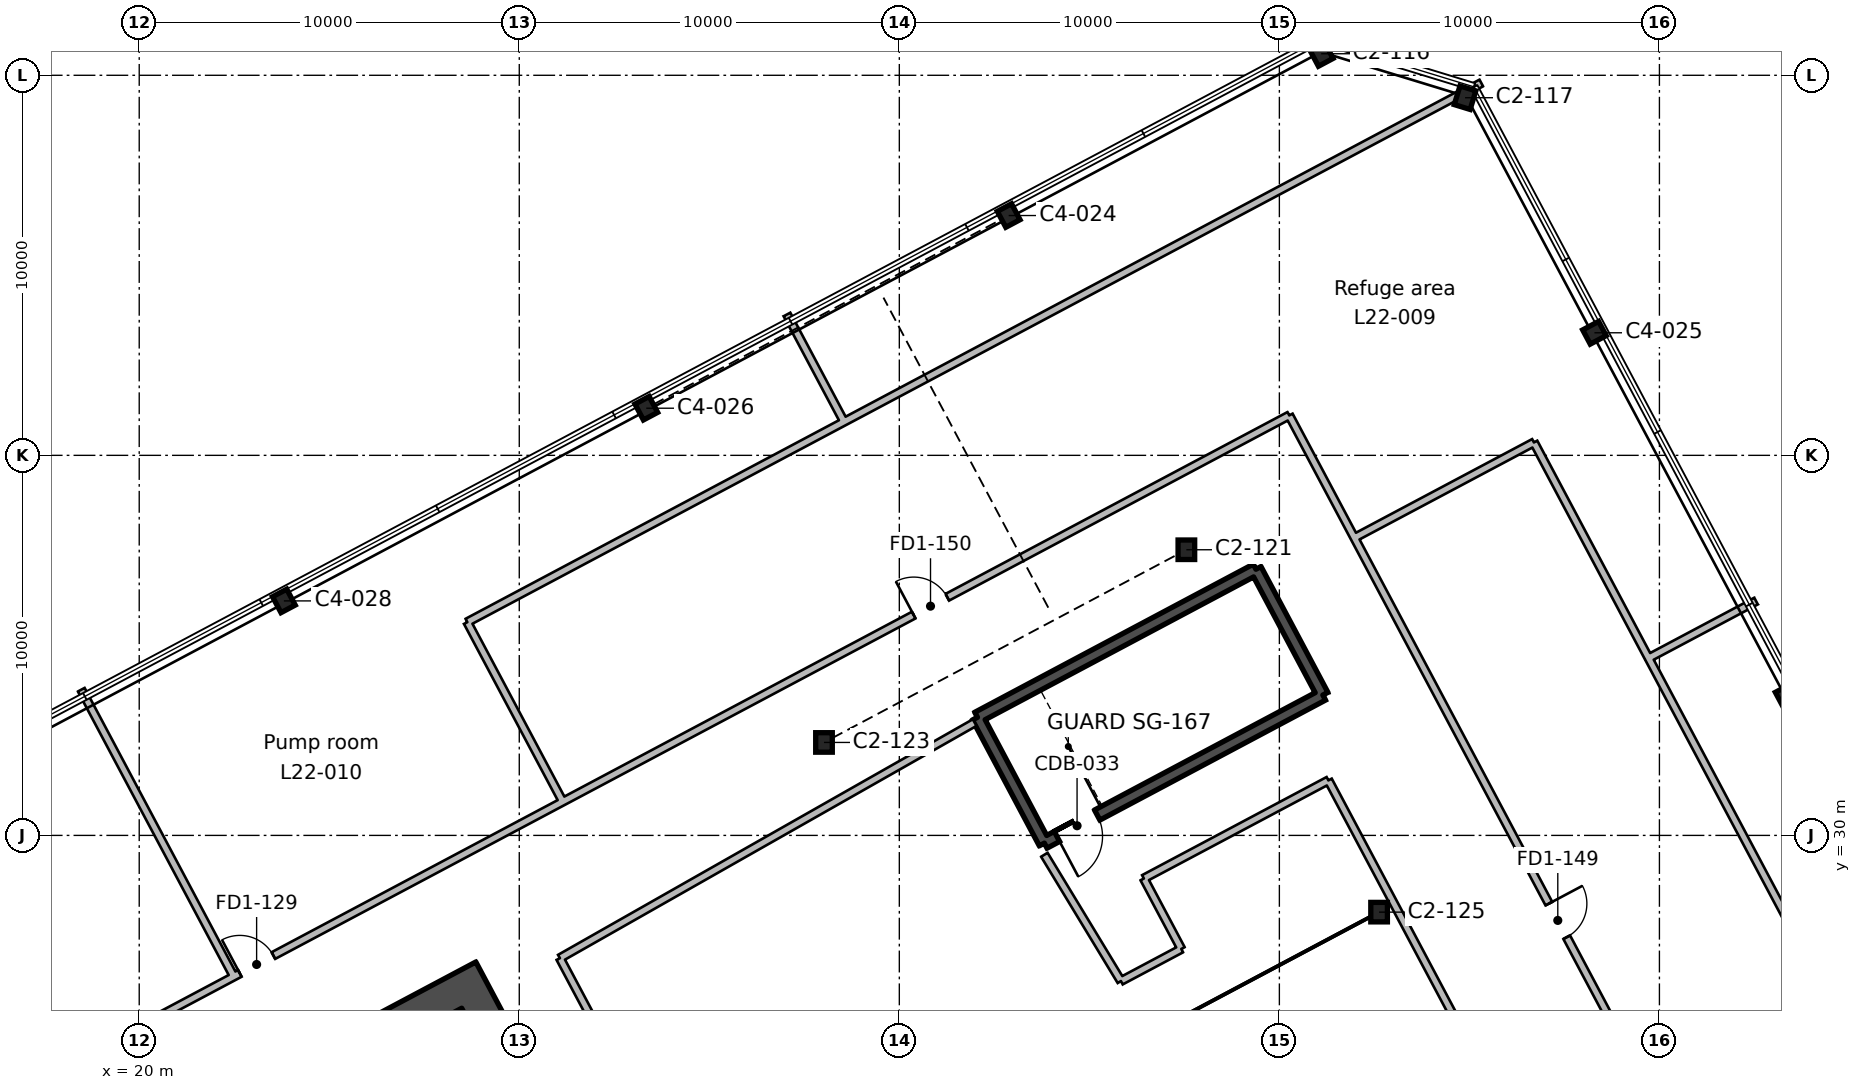
"""IFC4 building model, lengths in metres.
Left out: names, types, materials, properties, quantities, classifications, styles, units other than length and angle.
Written with IfcOpenShell. Run it as: python <this file> out.ifc"""

import sys

from ifc_helpers import new_model, si_unit, direction, frame, frame_2d, origin, origin_2d, place, context, subcontext, project, spatial, rectangle, i_section, extrude, element, fill, save


model = new_model("IFC4")
c1 = context("Model", 3, precision=1e-05, world=origin(), true_north=direction((0.0, 1.0)))
c2 = subcontext(c1, "Body", "Model", "MODEL_VIEW")
j1 = project(units=[si_unit("LENGTHUNIT", "METRE"), si_unit("PLANEANGLEUNIT", "RADIAN")], contexts=[c1])
p1 = place(None, origin())
s1 = spatial("IfcSite", under=j1, at=p1, CompositionType="ELEMENT")
p2 = place(p1, origin())
s2 = spatial("IfcBuilding", under=s1, at=p2, CompositionType="ELEMENT")
p3 = place(p2, frame((0.0, 0.0, 112.2)))
s3 = spatial("IfcBuildingStorey", under=s2, at=p3, CompositionType="ELEMENT", Elevation=112.2)
for number, where, z_axis, x_axis in (
    (1, (52.624, 27.981, 0.0), (0.0, 0.0, 1.0), (1.0, 0.0, 0.0)),
    (2, (38.018, 32.446, 0.0), (0.0, 0.0, 1.0), (1.0, 0.0, 0.0)),
):
    element("IfcColumn", number, at=place(p3, frame(where, z_axis=z_axis, x_axis=x_axis)), inside=s3, PredefinedType="COLUMN", context=c2, shape_type="SweptSolid", body=[
        extrude(i_section(OverallWidth=0.437, OverallDepth=0.513, WebThickness=0.061, FlangeThickness=0.097, FilletRadius=0.015, at=origin_2d()), origin(), (0.0, 0.0, 1.0), 6.0),
    ])
for number, where, z_axis, x_axis in (
    (3, (63.36, 33.689, 0.0), (0.0, 0.0, 1.0), (-0.469, 0.883, 0.0)),
    (4, (23.806, 36.17, 0.0), (0.0, 0.0, 1.0), (-0.883, -0.469, 0.0)),
):
    element("IfcColumn", number, at=place(p3, frame(where, z_axis=z_axis, x_axis=x_axis)), inside=s3, PredefinedType="COLUMN", context=c2, shape_type="SweptSolid", body=[
        extrude(i_section(OverallWidth=0.424, OverallDepth=0.475, WebThickness=0.048, FlangeThickness=0.077, FilletRadius=0.015, at=origin_2d()), origin(), (0.0, 0.0, 1.0), 6.0),
    ])
p4 = place(p3, frame((47.553, 37.516, 0.0), z_axis=(0.0, 0.0, 1.0), x_axis=(1.0, 0.0, 0.0)))
e5 = element("IfcColumn", 5, at=p4, inside=s3, PredefinedType="COLUMN", context=c2, shape_type="SweptSolid", body=[
    extrude(i_section(OverallWidth=0.437, OverallDepth=0.513, WebThickness=0.061, FlangeThickness=0.097, FilletRadius=0.015, at=origin_2d()), origin(), (0.0, 0.0, 1.0), 6.0),
])
for number, where, z_axis, x_axis in (
    (6, (33.342, 41.24, 0.0), (0.0, 0.0, 1.0), (-0.883, -0.469, 0.0)),
    (7, (58.29, 43.225, 0.0), (0.0, 0.0, 1.0), (-0.469, 0.883, 0.0)),
    (8, (42.877, 46.31, 0.0), (0.0, 0.0, 1.0), (-0.883, -0.469, 0.0)),
):
    element("IfcColumn", number, at=place(p3, frame(where, z_axis=z_axis, x_axis=x_axis)), inside=s3, PredefinedType="COLUMN", context=c2, shape_type="SweptSolid", body=[
        extrude(i_section(OverallWidth=0.424, OverallDepth=0.475, WebThickness=0.048, FlangeThickness=0.077, FilletRadius=0.015, at=origin_2d()), origin(), (0.0, 0.0, 1.0), 6.0),
    ])
for number, where, z_axis, x_axis in (
    (9, (54.886, 49.41, 0.0), (0.0, 0.0, 1.0), (-0.956, 0.292, 0.0)),
    (10, (51.1, 50.567, 0.0), (0.0, 0.0, 1.0), (-0.883, -0.469, 0.0)),
):
    element("IfcColumn", number, at=place(p3, frame(where, z_axis=z_axis, x_axis=x_axis)), inside=s3, PredefinedType="COLUMN", context=c2, shape_type="SweptSolid", body=[
        extrude(i_section(OverallWidth=0.437, OverallDepth=0.513, WebThickness=0.061, FlangeThickness=0.097, FilletRadius=0.015, at=origin_2d()), origin(), (0.0, 0.0, 1.0), 6.0),
    ])
p5 = place(p3, frame((37.849, 8.799, 0.0), z_axis=(0.0, 0.0, 1.0), x_axis=(-0.469465789982, 0.882950662289, 0.0)))
e11 = element("IfcWall", 11, at=p5, inside=s3, PredefinedType="SHEAR", context=c2, shape_type="SweptSolid", body=[
    extrude(rectangle(XDim=20.0, YDim=0.9, at=frame_2d((10.0, 0.0))), origin(), (0.0, 0.0, 1.0), 6.0),
])
p6 = place(p5, frame((10.6, 0.0, 0.0)))
e12 = element("IfcOpeningElement", 12, at=p6, cuts=e11, PredefinedType="OPENING", context=c2, shape_type="SweptSolid", body=[
    extrude(rectangle(XDim=2.4, YDim=2.4, at=frame_2d((1.2, 1.2))), frame((0.0, 0.46, 0.0), z_axis=(0.0, -1.0, 0.0), x_axis=(1.0, 0.0, 0.0)), (0.0, 0.0, 1.0), 0.92),
])
p7 = place(p3, frame((10.438, 16.366, 0.0), z_axis=(0.0, 0.0, 1.0), x_axis=(0.88294509198, 0.469476266226, 0.0)))
e13 = element("IfcWall", 13, at=p7, inside=s3, PredefinedType="SHEAR", context=c2, shape_type="SweptSolid", body=[
    extrude(rectangle(XDim=20.2, YDim=0.9, at=frame_2d((10.1, 0.0))), origin(), (0.0, 0.0, 1.0), 6.0),
])
p8 = place(p3, frame((49.384, 37.004, 0.0), z_axis=(0.0, 0.0, 1.0), x_axis=(0.46946936446, -0.882948761726, 0.0)))
e14 = element("IfcWall", 14, at=p8, inside=s3, PredefinedType="SHEAR", context=c2, shape_type="SweptSolid", body=[
    extrude(rectangle(XDim=3.75, YDim=0.3, at=frame_2d((1.875, 0.0))), origin(), (0.0, 0.0, 1.0), 6.0),
])
p9 = place(p3, frame((51.145, 33.693, 0.0), z_axis=(0.0, 0.0, 1.0), x_axis=(-0.882945809314, -0.469474917132, 0.0)))
e15 = element("IfcWall", 15, at=p9, inside=s3, PredefinedType="SHEAR", context=c2, shape_type="SweptSolid", body=[
    extrude(rectangle(XDim=8.3, YDim=0.3, at=frame_2d((4.15, 0.0))), origin(), (0.0, 0.0, 1.0), 6.0),
])
p10 = place(p9, frame((6.725, 0.0, 0.0)))
e16 = element("IfcOpeningElement", 16, at=p10, cuts=e15, PredefinedType="OPENING", context=c2, shape_type="SweptSolid", body=[
    extrude(rectangle(XDim=1.2, YDim=2.1, at=frame_2d((0.6, 1.05))), frame((0.0, 0.16, 0.0), z_axis=(0.0, -1.0, 0.0), x_axis=(1.0, 0.0, 0.0)), (0.0, 0.0, 1.0), 0.32),
])
p11 = place(p3, frame((43.816, 29.796, 0.0), z_axis=(0.0, 0.0, 1.0), x_axis=(-0.46946936446, 0.882948761726, 0.0)))
e17 = element("IfcWall", 17, at=p11, inside=s3, PredefinedType="SHEAR", context=c2, shape_type="SweptSolid", body=[
    extrude(rectangle(XDim=3.75, YDim=0.3, at=frame_2d((1.875, 0.0))), origin(), (0.0, 0.0, 1.0), 6.0),
])
p12 = place(p3, frame((42.055, 33.107, 0.0), z_axis=(0.0, 0.0, 1.0), x_axis=(0.882945809314, 0.469474917132, 0.0)))
e18 = element("IfcWall", 18, at=p12, inside=s3, PredefinedType="SHEAR", context=c2, shape_type="SweptSolid", body=[
    extrude(rectangle(XDim=8.3, YDim=0.3, at=frame_2d((4.15, 0.0))), origin(), (0.0, 0.0, 1.0), 6.0),
])
p13 = place(p3, frame((0.0, 14.327, 0.0), z_axis=(0.0, 0.0, 1.0), x_axis=(0.882944972043, 0.46947649179, 0.0)))
e19 = element("IfcWall", 19, at=p13, inside=s3, PredefinedType="PARTITIONING", context=c2, shape_type="SweptSolid", body=[
    extrude(rectangle(XDim=35.482, YDim=0.2, at=frame_2d((17.741, 0.0))), origin(), (0.0, 0.0, 1.0), 5.55),
])
p14 = place(p13, frame((25.65, 0.0, 0.0)))
e20 = element("IfcOpeningElement", 20, at=p14, cuts=e19, PredefinedType="OPENING", context=c2, shape_type="SweptSolid", body=[
    extrude(rectangle(XDim=1.0, YDim=2.1, at=frame_2d((0.5, 1.05))), frame((0.0, 0.11, 0.0), z_axis=(0.0, -1.0, 0.0), x_axis=(1.0, 0.0, 0.0)), (0.0, 0.0, 1.0), 0.22),
])
p15 = place(p13, frame((17.25, 0.0, 0.0)))
e21 = element("IfcOpeningElement", 21, at=p15, cuts=e19, PredefinedType="OPENING", context=c2, shape_type="SweptSolid", body=[
    extrude(rectangle(XDim=1.0, YDim=2.1, at=frame_2d((0.5, 1.05))), frame((0.0, 0.11, 0.0), z_axis=(0.0, -1.0, 0.0), x_axis=(1.0, 0.0, 0.0)), (0.0, 0.0, 1.0), 0.22),
])
p16 = place(p13, frame((8.55, 0.0, 0.0)))
e22 = element("IfcOpeningElement", 22, at=p16, cuts=e19, PredefinedType="OPENING", context=c2, shape_type="SweptSolid", body=[
    extrude(rectangle(XDim=1.0, YDim=2.1, at=frame_2d((0.5, 1.05))), frame((0.0, 0.11, 0.0), z_axis=(0.0, -1.0, 0.0), x_axis=(1.0, 0.0, 0.0)), (0.0, 0.0, 1.0), 0.22),
])
p17 = place(p3, frame((18.475, 33.834, 0.0), z_axis=(0.0, 0.0, 1.0), x_axis=(0.469471844694, -0.882947442965, 0.0)))
e23 = element("IfcWall", 23, at=p17, inside=s3, PredefinedType="PARTITIONING", context=c2, shape_type="SweptSolid", body=[
    extrude(rectangle(XDim=8.55, YDim=0.2, at=frame_2d((4.275, 0.0))), origin(), (0.0, 0.0, 1.0), 5.55),
])
p18 = place(p3, frame((31.137, 30.902, 0.0), z_axis=(0.0, 0.0, 1.0), x_axis=(-0.469485426614, 0.882940221191, 0.0)))
e24 = element("IfcWall", 24, at=p18, inside=s3, PredefinedType="PARTITIONING", context=c2, shape_type="SweptSolid", body=[
    extrude(rectangle(XDim=5.333, YDim=0.2, at=frame_2d((2.667, 0.0))), origin(), (0.0, 0.0, 1.0), 5.55),
])
p19 = place(p3, frame((28.633, 35.611, 0.0), z_axis=(0.0, 0.0, 1.0), x_axis=(0.882930875779, 0.469503001691, 0.0)))
e25 = element("IfcWall", 25, at=p19, inside=s3, PredefinedType="PARTITIONING", context=c2, shape_type="SweptSolid", body=[
    extrude(rectangle(XDim=10.641, YDim=0.2, at=frame_2d((5.32, 0.0))), origin(), (0.0, 0.0, 1.0), 5.55),
])
p20 = place(p3, frame((51.971, 37.835, 0.0), z_axis=(0.0, 0.0, 1.0), x_axis=(-0.469669656808, 0.882842235892, 0.0)))
e26 = element("IfcWall", 26, at=p20, inside=s3, PredefinedType="PARTITIONING", context=c2, shape_type="SweptSolid", body=[
    extrude(rectangle(XDim=3.643, YDim=0.2, at=frame_2d((1.821, 0.0))), origin(), (0.0, 0.0, 1.0), 5.55),
])
p21 = place(p3, frame((31.329, 30.985, 0.0), z_axis=(0.0, 0.0, 1.0), x_axis=(0.882954237751, 0.469459065349, 0.0)))
e27 = element("IfcWall", 27, at=p21, inside=s3, PredefinedType="PARTITIONING", context=c2, shape_type="SweptSolid", body=[
    extrude(rectangle(XDim=21.441, YDim=0.2, at=frame_2d((10.721, 0.0))), origin(), (0.0, 0.0, 1.0), 5.55),
])
p22 = place(p21, frame((10.25, 0.0, 0.0)))
e28 = element("IfcOpeningElement", 28, at=p22, cuts=e27, PredefinedType="OPENING", context=c2, shape_type="SweptSolid", body=[
    extrude(rectangle(XDim=1.0, YDim=2.1, at=frame_2d((0.5, 1.05))), frame((0.0, 0.11, 0.0), z_axis=(0.0, -1.0, 0.0), x_axis=(1.0, 0.0, 0.0)), (0.0, 0.0, 1.0), 0.22),
])
p23 = place(p3, frame((37.044, 43.707, 0.0), z_axis=(0.0, 0.0, 1.0), x_axis=(0.469447181805, -0.882960556025, 0.0)))
e29 = element("IfcWall", 29, at=p23, inside=s3, PredefinedType="PARTITIONING", context=c2, shape_type="SweptSolid", body=[
    extrude(rectangle(XDim=3.199, YDim=0.2, at=frame_2d((1.6, 0.0))), origin(), (0.0, 0.0, 1.0), 5.55),
])
p24 = place(p3, frame((38.028, 40.607, 0.0), z_axis=(0.0, 0.0, 1.0), x_axis=(0.882955326711, 0.469457017237, 0.0)))
e30 = element("IfcWall", 30, at=p24, inside=s3, PredefinedType="PARTITIONING", context=c2, shape_type="SweptSolid", body=[
    extrude(rectangle(XDim=19.576, YDim=0.2, at=frame_2d((9.788, 0.0))), origin(), (0.0, 0.0, 1.0), 5.55),
])
p25 = place(p3, frame((39.567, 10.788, 0.0), z_axis=(0.0, 0.0, 1.0), x_axis=(-0.469474056812, 0.882946266757, 0.0)))
e31 = element("IfcWall", 31, at=p25, inside=s3, PredefinedType="PARTITIONING", context=c2, shape_type="SweptSolid", body=[
    extrude(rectangle(XDim=18.101, YDim=0.2, at=frame_2d((9.05, 0.0))), origin(), (0.0, 0.0, 1.0), 5.55),
])
p26 = place(p25, frame((8.55, 0.0, 0.0)))
e32 = element("IfcOpeningElement", 32, at=p26, cuts=e31, PredefinedType="OPENING", context=c2, shape_type="SweptSolid", body=[
    extrude(rectangle(XDim=1.0, YDim=2.1, at=frame_2d((0.5, 1.05))), frame((0.0, 0.11, 0.0), z_axis=(0.0, -1.0, 0.0), x_axis=(1.0, 0.0, 0.0)), (0.0, 0.0, 1.0), 0.22),
])
p27 = place(p3, frame((31.069, 26.77, 0.0), z_axis=(0.0, 0.0, 1.0), x_axis=(0.86954617394, 0.493851649168, 0.0)))
e33 = element("IfcWall", 33, at=p27, inside=s3, PredefinedType="PARTITIONING", context=c2, shape_type="SweptSolid", body=[
    extrude(rectangle(XDim=12.55, YDim=0.2, at=frame_2d((6.275, 0.0))), origin(), (0.0, 0.0, 1.0), 5.55),
])
p28 = place(p3, frame((43.816, 29.491, 0.0), z_axis=(0.0, 0.0, 1.0), x_axis=(0.518473208291, -0.855093873376, 0.0)))
e34 = element("IfcWall", 34, at=p28, inside=s3, PredefinedType="PARTITIONING", context=c2, shape_type="SweptSolid", body=[
    extrude(rectangle(XDim=1.325, YDim=0.2, at=frame_2d((0.663, 0.0))), origin(), (0.0, 0.0, 1.0), 5.55),
])
p29 = place(p3, frame((45.831, 26.167, 0.0), z_axis=(0.0, 0.0, 1.0), x_axis=(-0.518386189645, 0.855146629757, 0.0)))
e35 = element("IfcWall", 35, at=p29, inside=s3, PredefinedType="PARTITIONING", context=c2, shape_type="SweptSolid", body=[
    extrude(rectangle(XDim=2.562, YDim=0.2, at=frame_2d((1.281, 0.0))), origin(), (0.0, 0.0, 1.0), 5.55),
])
p30 = place(p3, frame((47.42, 27.012, 0.0), z_axis=(0.0, 0.0, 1.0), x_axis=(-0.882911879422, -0.469538723829, 0.0)))
e36 = element("IfcWall", 36, at=p30, inside=s3, PredefinedType="PARTITIONING", context=c2, shape_type="SweptSolid", body=[
    extrude(rectangle(XDim=1.8, YDim=0.2, at=frame_2d((0.9, 0.0))), origin(), (0.0, 0.0, 1.0), 5.55),
])
p31 = place(p3, frame((46.434, 28.866, 0.0), z_axis=(0.0, 0.0, 1.0), x_axis=(0.882942083458, 0.469481924316, 0.0)))
e37 = element("IfcWall", 37, at=p31, inside=s3, PredefinedType="PARTITIONING", context=c2, shape_type="SweptSolid", body=[
    extrude(rectangle(XDim=5.5, YDim=0.2, at=frame_2d((2.75, 0.0))), origin(), (0.0, 0.0, 1.0), 5.55),
])
p32 = place(p3, frame((51.29, 31.448, 0.0), z_axis=(0.0, 0.0, 1.0), x_axis=(0.469459757109, -0.882953869947, 0.0)))
e38 = element("IfcWall", 38, at=p32, inside=s3, PredefinedType="PARTITIONING", context=c2, shape_type="SweptSolid", body=[
    extrude(rectangle(XDim=12.738, YDim=0.2, at=frame_2d((6.369, 0.0))), origin(), (0.0, 0.0, 1.0), 5.55),
])
p33 = place(p3, frame((47.42, 27.012, 0.0), z_axis=(0.0, 0.0, 1.0), x_axis=(-0.469489562011, 0.882938022266, 0.0)))
e39 = element("IfcWall", 39, at=p33, inside=s3, PredefinedType="PARTITIONING", context=c2, shape_type="SweptSolid", body=[
    extrude(rectangle(XDim=2.1, YDim=0.2, at=frame_2d((1.05, 0.0))), origin(), (0.0, 0.0, 1.0), 5.55),
])
p34 = place(p3, frame((51.971, 37.835, 0.0), z_axis=(0.0, 0.0, 1.0), x_axis=(0.469310046076, -0.883033453869, 0.0)))
e40 = element("IfcWall", 40, at=p34, inside=s3, PredefinedType="PARTITIONING", context=c2, shape_type="SweptSolid", body=[
    extrude(rectangle(XDim=1.23, YDim=0.2, at=frame_2d((0.615, 0.0))), origin(), (0.0, 0.0, 1.0), 5.55),
])
p35 = place(p3, frame((52.022, 37.854, 0.0), z_axis=(0.0, 0.0, 1.0), x_axis=(0.882963467498, 0.469441705714, 0.0)))
e41 = element("IfcWall", 41, at=p35, inside=s3, PredefinedType="PARTITIONING", context=c2, shape_type="SweptSolid", body=[
    extrude(rectangle(XDim=5.296, YDim=0.2, at=frame_2d((2.648, 0.0))), origin(), (0.0, 0.0, 1.0), 5.55),
])
p36 = place(p3, frame((56.698, 40.34, 0.0), z_axis=(0.0, 0.0, 1.0), x_axis=(0.4693776796, -0.882997505032, 0.0)))
e42 = element("IfcWall", 42, at=p36, inside=s3, PredefinedType="PARTITIONING", context=c2, shape_type="SweptSolid", body=[
    extrude(rectangle(XDim=6.419, YDim=0.2, at=frame_2d((3.209, 0.0))), origin(), (0.0, 0.0, 1.0), 5.55),
])
p37 = place(p3, frame((62.138, 18.713, 0.0), z_axis=(0.0, 0.0, 1.0), x_axis=(-0.469466289279, 0.882950396812, 0.0)))
e43 = element("IfcWall", 43, at=p37, inside=s3, PredefinedType="PARTITIONING", context=c2, shape_type="SweptSolid", body=[
    extrude(rectangle(XDim=20.427, YDim=0.2, at=frame_2d((10.213, 0.0))), origin(), (0.0, 0.0, 1.0), 5.55),
])
p38 = place(p37, frame((9.75, 0.0, 0.0)))
e44 = element("IfcOpeningElement", 44, at=p38, cuts=e43, PredefinedType="OPENING", context=c2, shape_type="SweptSolid", body=[
    extrude(rectangle(XDim=1.0, YDim=2.1, at=frame_2d((0.5, 1.05))), frame((0.0, 0.11, 0.0), z_axis=(0.0, -1.0, 0.0), x_axis=(1.0, 0.0, 0.0)), (0.0, 0.0, 1.0), 0.22),
])
p39 = place(p3, frame((59.711, 34.672, 0.0), z_axis=(0.0, 0.0, 1.0), x_axis=(0.469461626855, -0.882952875815, 0.0)))
e45 = element("IfcWall", 45, at=p39, inside=s3, PredefinedType="PARTITIONING", context=c2, shape_type="SweptSolid", body=[
    extrude(rectangle(XDim=15.437, YDim=0.2, at=frame_2d((7.719, 0.0))), origin(), (0.0, 0.0, 1.0), 5.55),
])
p40 = place(p3, frame((62.542, 36.166, 0.0), z_axis=(0.0, 0.0, 1.0), x_axis=(-0.883094981885, -0.46919425931, 0.0)))
e46 = element("IfcWall", 46, at=p40, inside=s3, PredefinedType="PARTITIONING", context=c2, shape_type="SweptSolid", body=[
    extrude(rectangle(XDim=3.201, YDim=0.2, at=frame_2d((1.601, 0.0))), origin(), (0.0, 0.0, 1.0), 5.55),
])
p41 = place(p10, origin())
e47 = element("IfcDoor", 47, at=p41, inside=s3, OperationType="SINGLE_SWING_RIGHT", PredefinedType="DOOR", context=c2, shape_type="SweptSolid", body=[
    extrude(rectangle(XDim=1.2, YDim=2.1, at=frame_2d((0.6, 1.05))), frame((0.0, 0.025, 0.0), z_axis=(0.0, -1.0, 0.0), x_axis=(1.0, 0.0, 0.0)), (0.0, 0.0, 1.0), 0.05),
])
fill(e16, e47)
p42 = place(p38, frame((1.0, 0.0, 0.0), z_axis=(0.0, 0.0, 1.0), x_axis=(-1.0, 0.0, 0.0)))
e48 = element("IfcDoor", 48, at=p42, inside=s3, OperationType="SINGLE_SWING_LEFT", PredefinedType="DOOR", context=c2, shape_type="SweptSolid", body=[
    extrude(rectangle(XDim=1.0, YDim=2.1, at=frame_2d((0.5, 1.05))), frame((0.0, 0.025, 0.0), z_axis=(0.0, -1.0, 0.0), x_axis=(1.0, 0.0, 0.0)), (0.0, 0.0, 1.0), 0.05),
])
fill(e44, e48)
p43 = place(p22, origin())
e49 = element("IfcDoor", 49, at=p43, inside=s3, OperationType="SINGLE_SWING_LEFT", PredefinedType="DOOR", context=c2, shape_type="SweptSolid", body=[
    extrude(rectangle(XDim=1.0, YDim=2.1, at=frame_2d((0.5, 1.05))), frame((0.0, 0.025, 0.0), z_axis=(0.0, -1.0, 0.0), x_axis=(1.0, 0.0, 0.0)), (0.0, 0.0, 1.0), 0.05),
])
fill(e28, e49)
p44 = place(p14, origin())
e50 = element("IfcDoor", 50, at=p44, inside=s3, OperationType="SINGLE_SWING_LEFT", PredefinedType="DOOR", context=c2, shape_type="SweptSolid", body=[
    extrude(rectangle(XDim=1.0, YDim=2.1, at=frame_2d((0.5, 1.05))), frame((0.0, 0.025, 0.0), z_axis=(0.0, -1.0, 0.0), x_axis=(1.0, 0.0, 0.0)), (0.0, 0.0, 1.0), 0.05),
])
fill(e20, e50)
save(model, sys.argv[1])
